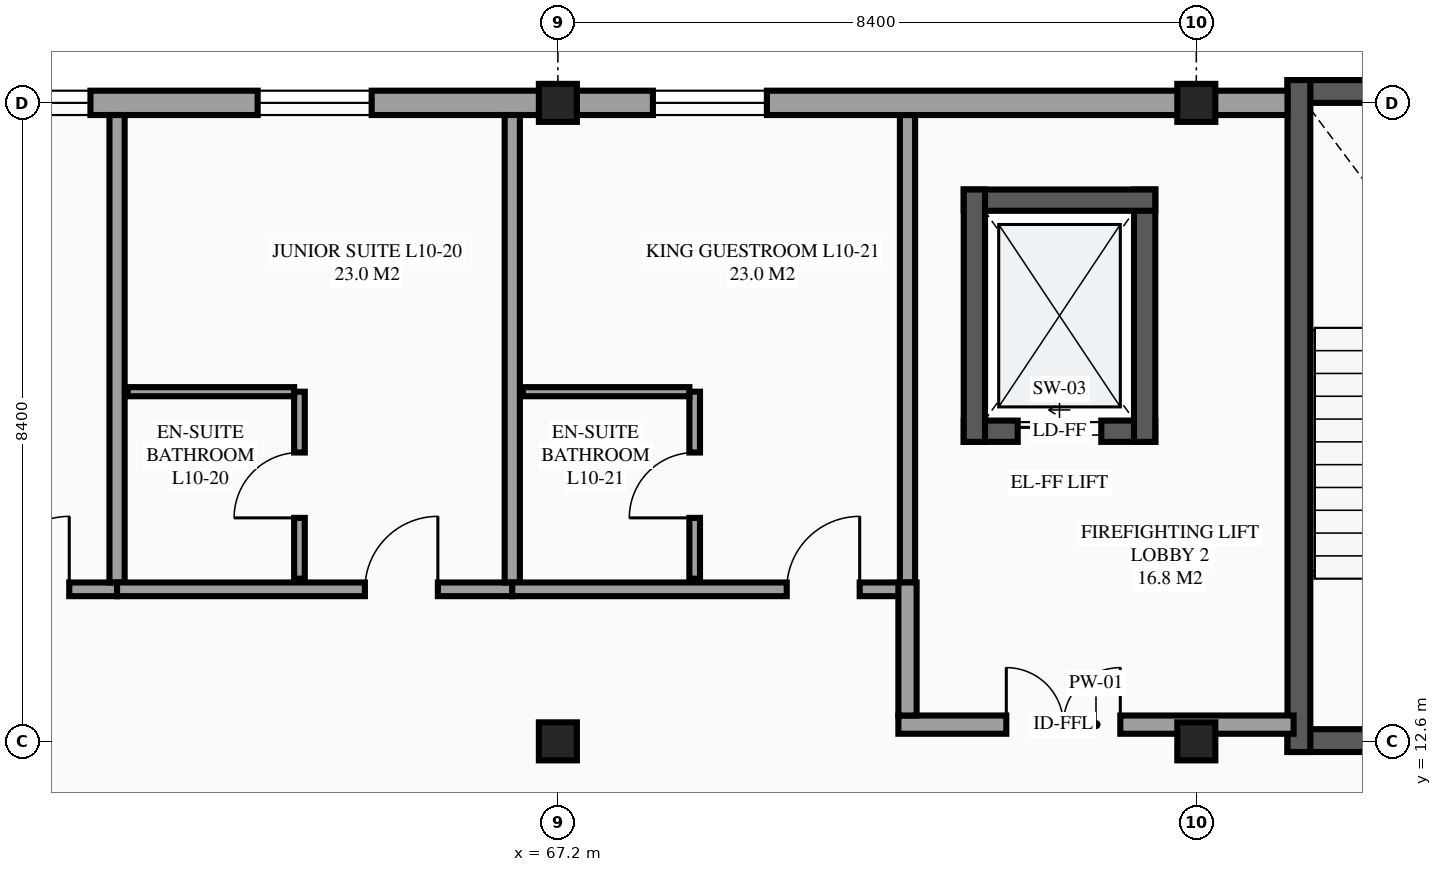
"""IFC4 building model, lengths in metres.
Left out: names, types, materials, properties, quantities, classifications, styles, units other than length and angle.
Written with IfcOpenShell. Run it as: python <this file> out.ifc"""

import sys

from ifc_helpers import new_model, si_unit, direction, frame, frame_2d, origin, origin_2d, place, context, subcontext, project, spatial, rectangle, extrude, element, fill, save


model = new_model("IFC4")
c1 = context("Model", 3, precision=1e-05, world=origin(), true_north=direction((0.0, 1.0)))
c2 = subcontext(c1, "Body", "Model", "MODEL_VIEW")
j1 = project(units=[si_unit("LENGTHUNIT", "METRE"), si_unit("PLANEANGLEUNIT", "RADIAN")], contexts=[c1])
p1 = place(None, origin())
s1 = spatial("IfcSite", under=j1, at=p1, CompositionType="ELEMENT")
p2 = place(p1, origin())
s2 = spatial("IfcBuilding", under=s1, at=p2, CompositionType="ELEMENT")
p3 = place(p2, frame((0.0, 0.0, 39.9)))
s3 = spatial("IfcBuildingStorey", under=s2, at=p3, CompositionType="ELEMENT", Elevation=39.9)
for number, where, z_axis, x_axis in (
    (1, (67.2, 12.6, 0.0), (0.0, 0.0, 1.0), (1.0, 0.0, 0.0)),
    (2, (67.2, 21.0, 0.0), (0.0, 0.0, 1.0), (1.0, 0.0, 0.0)),
    (3, (75.6, 12.6, 0.0), (0.0, 0.0, 1.0), (1.0, 0.0, 0.0)),
    (4, (75.6, 21.0, 0.0), (0.0, 0.0, 1.0), (1.0, 0.0, 0.0)),
):
    element("IfcColumn", number, at=place(p3, frame(where, z_axis=z_axis, x_axis=x_axis)), inside=s3, PredefinedType="COLUMN", context=c2, shape_type="SweptSolid", body=[
        extrude(rectangle(XDim=0.5, YDim=0.5, at=origin_2d()), origin(), (0.0, 0.0, 1.0), 3.6),
    ])
p4 = place(p3, frame((67.2, 21.0, 0.0), z_axis=(0.0, 0.0, 1.0), x_axis=(-1.0, 0.0, 0.0)))
e5 = element("IfcWall", 5, at=p4, inside=s3, PredefinedType="STANDARD", context=c2, shape_type="SweptSolid", body=[
    extrude(rectangle(XDim=16.8, YDim=0.32, at=frame_2d((8.4, 0.0))), origin(), (0.0, 0.0, 1.0), 2.53),
])
p5 = place(p4, frame((12.85, 0.0, 0.85)))
e6 = element("IfcOpeningElement", 6, at=p5, cuts=e5, PredefinedType="OPENING", context=c2, shape_type="SweptSolid", body=[
    extrude(rectangle(XDim=1.5, YDim=1.5, at=frame_2d((0.75, 0.75))), frame((0.0, 0.17, 0.0), z_axis=(0.0, -1.0, 0.0), x_axis=(1.0, 0.0, 0.0)), (0.0, 0.0, 1.0), 0.34),
])
p6 = place(p4, frame((6.15, 0.0, 0.85)))
e7 = element("IfcOpeningElement", 7, at=p6, cuts=e5, PredefinedType="OPENING", context=c2, shape_type="SweptSolid", body=[
    extrude(rectangle(XDim=1.5, YDim=1.5, at=frame_2d((0.75, 0.75))), frame((0.0, 0.17, 0.0), z_axis=(0.0, -1.0, 0.0), x_axis=(1.0, 0.0, 0.0)), (0.0, 0.0, 1.0), 0.34),
])
p7 = place(p4, frame((2.45, 0.0, 0.85)))
e8 = element("IfcOpeningElement", 8, at=p7, cuts=e5, PredefinedType="OPENING", context=c2, shape_type="SweptSolid", body=[
    extrude(rectangle(XDim=1.5, YDim=1.5, at=frame_2d((0.75, 0.75))), frame((0.0, 0.17, 0.0), z_axis=(0.0, -1.0, 0.0), x_axis=(1.0, 0.0, 0.0)), (0.0, 0.0, 1.0), 0.34),
])
p8 = place(p3, frame((72.54, 16.68, 0.0), z_axis=(0.0, 0.0, 1.0), x_axis=(1.0, 0.0, 0.0)))
e9 = element("IfcWall", 9, at=p8, inside=s3, PredefinedType="SHEAR", context=c2, shape_type="SweptSolid", body=[
    extrude(rectangle(XDim=2.52, YDim=0.28, at=frame_2d((1.26, 0.0))), origin(), (0.0, 0.0, 1.0), 3.6),
])
p9 = place(p8, frame((0.71, 0.0, 0.0)))
e10 = element("IfcOpeningElement", 10, at=p9, cuts=e9, PredefinedType="OPENING", context=c2, shape_type="SweptSolid", body=[
    extrude(rectangle(XDim=1.1, YDim=2.2, at=frame_2d((0.55, 1.1))), frame((0.0, 0.15, 0.0), z_axis=(0.0, -1.0, 0.0), x_axis=(1.0, 0.0, 0.0)), (0.0, 0.0, 1.0), 0.3),
])
p10 = place(p3, frame((74.92, 16.54, 0.0), z_axis=(0.0, 0.0, 1.0), x_axis=(0.0, 1.0, 0.0)))
e11 = element("IfcWall", 11, at=p10, inside=s3, PredefinedType="SHEAR", context=c2, shape_type="SweptSolid", body=[
    extrude(rectangle(XDim=3.32, YDim=0.28, at=frame_2d((1.66, 0.0))), origin(), (0.0, 0.0, 1.0), 3.6),
])
p11 = place(p3, frame((75.06, 19.72, 0.0), z_axis=(0.0, 0.0, 1.0), x_axis=(-1.0, 0.0, 0.0)))
e12 = element("IfcWall", 12, at=p11, inside=s3, PredefinedType="SHEAR", context=c2, shape_type="SweptSolid", body=[
    extrude(rectangle(XDim=2.52, YDim=0.28, at=frame_2d((1.26, 0.0))), origin(), (0.0, 0.0, 1.0), 3.6),
])
p12 = place(p3, frame((72.68, 19.86, 0.0), z_axis=(0.0, 0.0, 1.0), x_axis=(0.0, -1.0, 0.0)))
e13 = element("IfcWall", 13, at=p12, inside=s3, PredefinedType="SHEAR", context=c2, shape_type="SweptSolid", body=[
    extrude(rectangle(XDim=3.32, YDim=0.28, at=frame_2d((1.66, 0.0))), origin(), (0.0, 0.0, 1.0), 3.6),
])
p13 = place(p3, frame((76.8, 12.61, 0.0), z_axis=(0.0, 0.0, 1.0), x_axis=(1.0, 0.0, 0.0)))
e14 = element("IfcWall", 14, at=p13, inside=s3, PredefinedType="SHEAR", context=c2, shape_type="SweptSolid", body=[
    extrude(rectangle(XDim=5.2, YDim=0.3, at=frame_2d((2.6, 0.0))), origin(), (0.0, 0.0, 1.0), 3.6),
])
p14 = place(p13, frame((2.025, 0.0, 0.0)))
e15 = element("IfcOpeningElement", 15, at=p14, cuts=e14, PredefinedType="OPENING", context=c2, shape_type="SweptSolid", body=[
    extrude(rectangle(XDim=1.15, YDim=2.15, at=frame_2d((0.575, 1.075))), frame((0.0, 0.16, 0.0), z_axis=(0.0, -1.0, 0.0), x_axis=(1.0, 0.0, 0.0)), (0.0, 0.0, 1.0), 0.32),
])
p15 = place(p3, frame((82.0, 21.15, 0.0), z_axis=(0.0, 0.0, 1.0), x_axis=(-1.0, 0.0, 0.0)))
e16 = element("IfcWall", 16, at=p15, inside=s3, PredefinedType="SHEAR", context=c2, shape_type="SweptSolid", body=[
    extrude(rectangle(XDim=5.2, YDim=0.3, at=frame_2d((2.6, 0.0))), origin(), (0.0, 0.0, 1.0), 3.6),
])
p16 = place(p3, frame((76.95, 21.3, 0.0), z_axis=(0.0, 0.0, 1.0), x_axis=(0.0, -1.0, 0.0)))
e17 = element("IfcWall", 17, at=p16, inside=s3, PredefinedType="SHEAR", context=c2, shape_type="SweptSolid", body=[
    extrude(rectangle(XDim=8.84, YDim=0.3, at=frame_2d((4.42, 0.0))), origin(), (0.0, 0.0, 1.0), 3.6),
])
p17 = place(p3, frame((56.2, 14.6, 0.0), z_axis=(0.0, 0.0, 1.0), x_axis=(1.0, 0.0, 0.0)))
e18 = element("IfcWall", 18, at=p17, inside=s3, PredefinedType="PARTITIONING", context=c2, shape_type="SweptSolid", body=[
    extrude(rectangle(XDim=5.2, YDim=0.18, at=frame_2d((2.6, 0.0))), origin(), (0.0, 0.0, 1.0), 3.375),
])
p18 = place(p17, frame((3.611, 0.0, 0.0)))
e19 = element("IfcOpeningElement", 19, at=p18, cuts=e18, PredefinedType="OPENING", context=c2, shape_type="SweptSolid", body=[
    extrude(rectangle(XDim=0.96, YDim=2.15, at=frame_2d((0.48, 1.075))), frame((0.0, 0.1, 0.0), z_axis=(0.0, -1.0, 0.0), x_axis=(1.0, 0.0, 0.0)), (0.0, 0.0, 1.0), 0.2),
])
p19 = place(p3, frame((61.4, 14.69, 0.0), z_axis=(0.0, 0.0, 1.0), x_axis=(0.0, 1.0, 0.0)))
e20 = element("IfcWall", 20, at=p19, inside=s3, PredefinedType="PARTITIONING", context=c2, shape_type="SweptSolid", body=[
    extrude(rectangle(XDim=6.15, YDim=0.2, at=frame_2d((3.075, 0.0))), origin(), (0.0, 0.0, 1.0), 3.375),
])
p20 = place(p3, frame((61.4, 14.6, 0.0), z_axis=(0.0, 0.0, 1.0), x_axis=(1.0, 0.0, 0.0)))
e21 = element("IfcWall", 21, at=p20, inside=s3, PredefinedType="PARTITIONING", context=c2, shape_type="SweptSolid", body=[
    extrude(rectangle(XDim=5.2, YDim=0.18, at=frame_2d((2.6, 0.0))), origin(), (0.0, 0.0, 1.0), 3.375),
])
p21 = place(p20, frame((3.261, 0.0, 0.0)))
e22 = element("IfcOpeningElement", 22, at=p21, cuts=e21, PredefinedType="OPENING", context=c2, shape_type="SweptSolid", body=[
    extrude(rectangle(XDim=0.96, YDim=2.15, at=frame_2d((0.48, 1.075))), frame((0.0, 0.1, 0.0), z_axis=(0.0, -1.0, 0.0), x_axis=(1.0, 0.0, 0.0)), (0.0, 0.0, 1.0), 0.2),
])
p22 = place(p3, frame((66.6, 14.69, 0.0), z_axis=(0.0, 0.0, 1.0), x_axis=(0.0, 1.0, 0.0)))
e23 = element("IfcWall", 23, at=p22, inside=s3, PredefinedType="PARTITIONING", context=c2, shape_type="SweptSolid", body=[
    extrude(rectangle(XDim=6.15, YDim=0.2, at=frame_2d((3.075, 0.0))), origin(), (0.0, 0.0, 1.0), 3.375),
])
p23 = place(p3, frame((63.8, 14.74, 0.0), z_axis=(0.0, 0.0, 1.0), x_axis=(0.0, 1.0, 0.0)))
e24 = element("IfcWall", 24, at=p23, inside=s3, PredefinedType="PARTITIONING", context=c2, shape_type="SweptSolid", body=[
    extrude(rectangle(XDim=2.46, YDim=0.14, at=frame_2d((1.23, 0.0))), origin(), (0.0, 0.0, 1.0), 3.375),
])
p24 = place(p23, frame((0.8, 0.0, 0.0)))
e25 = element("IfcOpeningElement", 25, at=p24, cuts=e24, PredefinedType="OPENING", context=c2, shape_type="SweptSolid", body=[
    extrude(rectangle(XDim=0.86, YDim=2.1, at=frame_2d((0.43, 1.05))), frame((0.0, 0.08, 0.0), z_axis=(0.0, -1.0, 0.0), x_axis=(1.0, 0.0, 0.0)), (0.0, 0.0, 1.0), 0.16),
])
p25 = place(p3, frame((61.54, 17.2, 0.0), z_axis=(0.0, 0.0, 1.0), x_axis=(1.0, 0.0, 0.0)))
e26 = element("IfcWall", 26, at=p25, inside=s3, PredefinedType="PARTITIONING", context=c2, shape_type="SweptSolid", body=[
    extrude(rectangle(XDim=2.19, YDim=0.12, at=frame_2d((1.095, 0.0))), origin(), (0.0, 0.0, 1.0), 3.375),
])
p26 = place(p3, frame((66.6, 14.6, 0.0), z_axis=(0.0, 0.0, 1.0), x_axis=(1.0, 0.0, 0.0)))
e27 = element("IfcWall", 27, at=p26, inside=s3, PredefinedType="PARTITIONING", context=c2, shape_type="SweptSolid", body=[
    extrude(rectangle(XDim=5.2, YDim=0.18, at=frame_2d((2.6, 0.0))), origin(), (0.0, 0.0, 1.0), 3.375),
])
p27 = place(p26, frame((3.611, 0.0, 0.0)))
e28 = element("IfcOpeningElement", 28, at=p27, cuts=e27, PredefinedType="OPENING", context=c2, shape_type="SweptSolid", body=[
    extrude(rectangle(XDim=0.96, YDim=2.15, at=frame_2d((0.48, 1.075))), frame((0.0, 0.1, 0.0), z_axis=(0.0, -1.0, 0.0), x_axis=(1.0, 0.0, 0.0)), (0.0, 0.0, 1.0), 0.2),
])
p28 = place(p3, frame((71.8, 14.69, 0.0), z_axis=(0.0, 0.0, 1.0), x_axis=(0.0, 1.0, 0.0)))
e29 = element("IfcWall", 29, at=p28, inside=s3, PredefinedType="PARTITIONING", context=c2, shape_type="SweptSolid", body=[
    extrude(rectangle(XDim=6.15, YDim=0.2, at=frame_2d((3.075, 0.0))), origin(), (0.0, 0.0, 1.0), 3.375),
])
p29 = place(p3, frame((69.0, 14.74, 0.0), z_axis=(0.0, 0.0, 1.0), x_axis=(0.0, 1.0, 0.0)))
e30 = element("IfcWall", 30, at=p29, inside=s3, PredefinedType="PARTITIONING", context=c2, shape_type="SweptSolid", body=[
    extrude(rectangle(XDim=2.46, YDim=0.14, at=frame_2d((1.23, 0.0))), origin(), (0.0, 0.0, 1.0), 3.375),
])
p30 = place(p29, frame((0.8, 0.0, 0.0)))
e31 = element("IfcOpeningElement", 31, at=p30, cuts=e30, PredefinedType="OPENING", context=c2, shape_type="SweptSolid", body=[
    extrude(rectangle(XDim=0.86, YDim=2.1, at=frame_2d((0.43, 1.05))), frame((0.0, 0.08, 0.0), z_axis=(0.0, -1.0, 0.0), x_axis=(1.0, 0.0, 0.0)), (0.0, 0.0, 1.0), 0.16),
])
p31 = place(p3, frame((66.74, 17.2, 0.0), z_axis=(0.0, 0.0, 1.0), x_axis=(1.0, 0.0, 0.0)))
e32 = element("IfcWall", 32, at=p31, inside=s3, PredefinedType="PARTITIONING", context=c2, shape_type="SweptSolid", body=[
    extrude(rectangle(XDim=2.19, YDim=0.12, at=frame_2d((1.095, 0.0))), origin(), (0.0, 0.0, 1.0), 3.375),
])
p32 = place(p3, frame((71.68, 12.82, 0.0), z_axis=(0.0, 0.0, 1.0), x_axis=(1.0, 0.0, 0.0)))
e33 = element("IfcWall", 33, at=p32, inside=s3, PredefinedType="PARTITIONING", context=c2, shape_type="SweptSolid", body=[
    extrude(rectangle(XDim=5.2, YDim=0.24, at=frame_2d((2.6, 0.0))), origin(), (0.0, 0.0, 1.0), 2.53),
])
p33 = place(p32, frame((1.42, 0.0, 0.0)))
e34 = element("IfcOpeningElement", 34, at=p33, cuts=e33, PredefinedType="OPENING", context=c2, shape_type="SweptSolid", body=[
    extrude(rectangle(XDim=1.5, YDim=2.15, at=frame_2d((0.75, 1.075))), frame((0.0, 0.13, 0.0), z_axis=(0.0, -1.0, 0.0), x_axis=(1.0, 0.0, 0.0)), (0.0, 0.0, 1.0), 0.26),
])
p34 = place(p3, frame((71.8, 12.94, 0.0), z_axis=(0.0, 0.0, 1.0), x_axis=(0.0, 1.0, 0.0)))
e35 = element("IfcWall", 35, at=p34, inside=s3, PredefinedType="PARTITIONING", context=c2, shape_type="SweptSolid", body=[
    extrude(rectangle(XDim=1.75, YDim=0.24, at=frame_2d((0.875, 0.0))), origin(), (0.0, 0.0, 1.0), 3.375),
])
p35 = place(p3, frame((76.8, 21.0, 0.0), z_axis=(0.0, 0.0, 1.0), x_axis=(-1.0, 0.0, 0.0)))
e36 = element("IfcWall", 36, at=p35, inside=s3, PredefinedType="STANDARD", context=c2, shape_type="SweptSolid", body=[
    extrude(rectangle(XDim=1.2, YDim=0.32, at=frame_2d((0.6, 0.0))), origin(), (0.0, 0.0, 1.0), 2.63),
])
p36 = place(p3, frame((75.6, 21.0, 0.0), z_axis=(0.0, 0.0, 1.0), x_axis=(-1.0, 0.0, 0.0)))
e37 = element("IfcWall", 37, at=p36, inside=s3, PredefinedType="STANDARD", context=c2, shape_type="SweptSolid", body=[
    extrude(rectangle(XDim=8.4, YDim=0.32, at=frame_2d((4.2, 0.0))), origin(), (0.0, 0.0, 1.0), 2.88),
])
p37 = place(p36, frame((5.65, 0.0, 0.85)))
e38 = element("IfcOpeningElement", 38, at=p37, cuts=e37, PredefinedType="OPENING", context=c2, shape_type="SweptSolid", body=[
    extrude(rectangle(XDim=1.5, YDim=1.5, at=frame_2d((0.75, 0.75))), frame((0.0, 0.17, 0.0), z_axis=(0.0, -1.0, 0.0), x_axis=(1.0, 0.0, 0.0)), (0.0, 0.0, 1.0), 0.34),
])
p38 = place(p6, origin())
e39 = element("IfcWindow", 39, at=p38, inside=s3, PartitioningType="SINGLE_PANEL", PredefinedType="WINDOW", context=c2, shape_type="SweptSolid", body=[
    extrude(rectangle(XDim=1.5, YDim=1.5, at=frame_2d((0.75, 0.75))), frame((0.0, 0.03, 0.0), z_axis=(0.0, -1.0, 0.0), x_axis=(1.0, 0.0, 0.0)), (0.0, 0.0, 1.0), 0.06),
])
fill(e7, e39)
p39 = place(p7, origin())
e40 = element("IfcWindow", 40, at=p39, inside=s3, PartitioningType="SINGLE_PANEL", PredefinedType="WINDOW", context=c2, shape_type="SweptSolid", body=[
    extrude(rectangle(XDim=1.5, YDim=1.5, at=frame_2d((0.75, 0.75))), frame((0.0, 0.03, 0.0), z_axis=(0.0, -1.0, 0.0), x_axis=(1.0, 0.0, 0.0)), (0.0, 0.0, 1.0), 0.06),
])
fill(e8, e40)
p40 = place(p37, origin())
e41 = element("IfcWindow", 41, at=p40, inside=s3, PartitioningType="SINGLE_PANEL", PredefinedType="WINDOW", context=c2, shape_type="SweptSolid", body=[
    extrude(rectangle(XDim=1.5, YDim=1.5, at=frame_2d((0.75, 0.75))), frame((0.0, 0.03, 0.0), z_axis=(0.0, -1.0, 0.0), x_axis=(1.0, 0.0, 0.0)), (0.0, 0.0, 1.0), 0.06),
])
fill(e38, e41)
p41 = place(p9, origin())
e42 = element("IfcDoor", 42, at=p41, inside=s3, OperationType="SLIDING_TO_LEFT", PredefinedType="DOOR", context=c2, shape_type="SweptSolid", body=[
    extrude(rectangle(XDim=1.1, YDim=2.2, at=frame_2d((0.55, 1.1))), frame((0.0, 0.025, 0.0), z_axis=(0.0, -1.0, 0.0), x_axis=(1.0, 0.0, 0.0)), (0.0, 0.0, 1.0), 0.05),
])
fill(e10, e42)
p42 = place(p18, origin())
e43 = element("IfcDoor", 43, at=p42, inside=s3, OperationType="SINGLE_SWING_RIGHT", PredefinedType="DOOR", context=c2, shape_type="SweptSolid", body=[
    extrude(rectangle(XDim=0.96, YDim=2.15, at=frame_2d((0.48, 1.075))), frame((0.0, 0.025, 0.0), z_axis=(0.0, -1.0, 0.0), x_axis=(1.0, 0.0, 0.0)), (0.0, 0.0, 1.0), 0.05),
])
fill(e19, e43)
p43 = place(p21, origin())
e44 = element("IfcDoor", 44, at=p43, inside=s3, OperationType="SINGLE_SWING_RIGHT", PredefinedType="DOOR", context=c2, shape_type="SweptSolid", body=[
    extrude(rectangle(XDim=0.96, YDim=2.15, at=frame_2d((0.48, 1.075))), frame((0.0, 0.025, 0.0), z_axis=(0.0, -1.0, 0.0), x_axis=(1.0, 0.0, 0.0)), (0.0, 0.0, 1.0), 0.05),
])
fill(e22, e44)
p44 = place(p24, origin())
e45 = element("IfcDoor", 45, at=p44, inside=s3, OperationType="SINGLE_SWING_LEFT", PredefinedType="DOOR", context=c2, shape_type="SweptSolid", body=[
    extrude(rectangle(XDim=0.86, YDim=2.1, at=frame_2d((0.43, 1.05))), frame((0.0, 0.025, 0.0), z_axis=(0.0, -1.0, 0.0), x_axis=(1.0, 0.0, 0.0)), (0.0, 0.0, 1.0), 0.05),
])
fill(e25, e45)
p45 = place(p27, origin())
e46 = element("IfcDoor", 46, at=p45, inside=s3, OperationType="SINGLE_SWING_RIGHT", PredefinedType="DOOR", context=c2, shape_type="SweptSolid", body=[
    extrude(rectangle(XDim=0.96, YDim=2.15, at=frame_2d((0.48, 1.075))), frame((0.0, 0.025, 0.0), z_axis=(0.0, -1.0, 0.0), x_axis=(1.0, 0.0, 0.0)), (0.0, 0.0, 1.0), 0.05),
])
fill(e28, e46)
p46 = place(p30, origin())
e47 = element("IfcDoor", 47, at=p46, inside=s3, OperationType="SINGLE_SWING_LEFT", PredefinedType="DOOR", context=c2, shape_type="SweptSolid", body=[
    extrude(rectangle(XDim=0.86, YDim=2.1, at=frame_2d((0.43, 1.05))), frame((0.0, 0.025, 0.0), z_axis=(0.0, -1.0, 0.0), x_axis=(1.0, 0.0, 0.0)), (0.0, 0.0, 1.0), 0.05),
])
fill(e31, e47)
p47 = place(p33, origin())
e48 = element("IfcDoor", 48, at=p47, inside=s3, OperationType="DOUBLE_DOOR_SINGLE_SWING", PredefinedType="DOOR", context=c2, shape_type="SweptSolid", body=[
    extrude(rectangle(XDim=1.5, YDim=2.15, at=frame_2d((0.75, 1.075))), frame((0.0, 0.025, 0.0), z_axis=(0.0, -1.0, 0.0), x_axis=(1.0, 0.0, 0.0)), (0.0, 0.0, 1.0), 0.05),
])
fill(e34, e48)
save(model, sys.argv[1])
